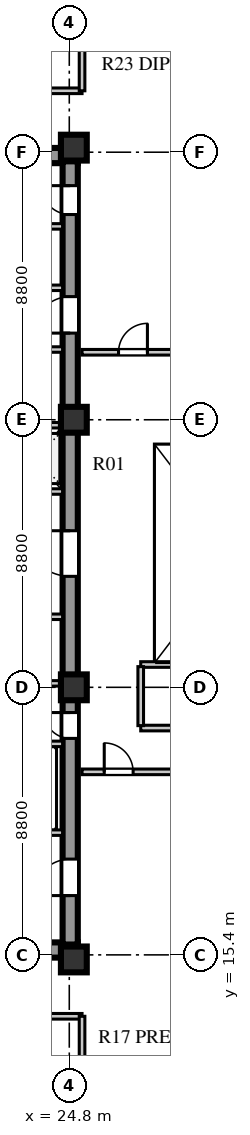
"""IFC4 building model, lengths in metres.
Left out: names, types, materials, properties, quantities, classifications, styles, units other than length and angle.
Written with IfcOpenShell. Run it as: python <this file> out.ifc"""

import sys

from ifc_helpers import new_model, si_unit, direction, frame, frame_2d, origin, origin_2d, place, context, subcontext, project, spatial, rectangle, extrude, element, fill, save


model = new_model("IFC4")
c1 = context("Model", 3, precision=1e-05, world=origin(), true_north=direction((0.0, 1.0)))
c2 = subcontext(c1, "Body", "Model", "MODEL_VIEW")
j1 = project(units=[si_unit("LENGTHUNIT", "METRE"), si_unit("PLANEANGLEUNIT", "RADIAN")], contexts=[c1])
p1 = place(None, origin())
s1 = spatial("IfcSite", under=j1, at=p1, CompositionType="ELEMENT")
p2 = place(p1, origin())
s2 = spatial("IfcBuilding", under=s1, at=p2, CompositionType="ELEMENT")
p3 = place(p2, frame((0.0, 0.0, 157.9)))
s3 = spatial("IfcBuildingStorey", under=s2, at=p3, CompositionType="ELEMENT", Elevation=157.9)
for number, where, z_axis, x_axis in (
    (1, (15.4, 15.56, 0.0), (0.0, 0.0, 1.0), (1.0, 0.0, 0.0)),
    (2, (15.4, 41.69, 0.0), (0.0, 0.0, 1.0), (1.0, 0.0, 0.0)),
):
    element("IfcWall", number, at=place(p3, frame(where, z_axis=z_axis, x_axis=x_axis)), inside=s3, PredefinedType="SHEAR", context=c2, shape_type="SweptSolid", body=[
        extrude(rectangle(XDim=9.68, YDim=0.5, at=frame_2d((4.84, 0.0))), origin(), (0.0, 0.0, 1.0), 3.6),
    ])
p4 = place(p3, frame((24.83, 15.74, 0.0), z_axis=(0.0, 0.0, 1.0), x_axis=(0.0, 1.0, 0.0)))
e3 = element("IfcWall", 3, at=p4, inside=s3, PredefinedType="SHEAR", context=c2, shape_type="SweptSolid", body=[
    extrude(rectangle(XDim=25.76, YDim=0.5, at=frame_2d((12.88, 0.0))), origin(), (0.0, 0.0, 1.0), 3.6),
])
p5 = place(p4, frame((1.61, 0.0, 0.0)))
e4 = element("IfcOpeningElement", 4, at=p5, cuts=e3, PredefinedType="OPENING", context=c2, shape_type="SweptSolid", body=[
    extrude(rectangle(XDim=1.2, YDim=2.1, at=frame_2d((0.6, 1.05))), frame((0.0, 0.26, 0.0), z_axis=(0.0, -1.0, 0.0), x_axis=(1.0, 0.0, 0.0)), (0.0, 0.0, 1.0), 0.52),
])
p6 = place(p4, frame((6.78, 0.0, 0.0)))
e5 = element("IfcOpeningElement", 5, at=p6, cuts=e3, PredefinedType="OPENING", context=c2, shape_type="SweptSolid", body=[
    extrude(rectangle(XDim=0.85, YDim=2.06, at=frame_2d((0.425, 1.03))), frame((0.0, 0.26, 0.0), z_axis=(0.0, -1.0, 0.0), x_axis=(1.0, 0.0, 0.0)), (0.0, 0.0, 1.0), 0.52),
])
p7 = place(p4, frame((12.11, 0.0, 0.0)))
e6 = element("IfcOpeningElement", 6, at=p7, cuts=e3, PredefinedType="OPENING", context=c2, shape_type="SweptSolid", body=[
    extrude(rectangle(XDim=1.5, YDim=2.12, at=frame_2d((0.75, 1.06))), frame((0.0, 0.26, 0.0), z_axis=(0.0, -1.0, 0.0), x_axis=(1.0, 0.0, 0.0)), (0.0, 0.0, 1.0), 0.52),
])
p8 = place(p4, frame((20.11, 0.0, 0.0)))
e7 = element("IfcOpeningElement", 7, at=p8, cuts=e3, PredefinedType="OPENING", context=c2, shape_type="SweptSolid", body=[
    extrude(rectangle(XDim=1.2, YDim=2.12, at=frame_2d((0.6, 1.06))), frame((0.0, 0.26, 0.0), z_axis=(0.0, -1.0, 0.0), x_axis=(1.0, 0.0, 0.0)), (0.0, 0.0, 1.0), 0.52),
])
p9 = place(p4, frame((24.01, 0.0, 0.0)))
e8 = element("IfcOpeningElement", 8, at=p9, cuts=e3, PredefinedType="OPENING", context=c2, shape_type="SweptSolid", body=[
    extrude(rectangle(XDim=0.95, YDim=2.1, at=frame_2d((0.475, 1.05))), frame((0.0, 0.26, 0.0), z_axis=(0.0, -1.0, 0.0), x_axis=(1.0, 0.0, 0.0)), (0.0, 0.0, 1.0), 0.52),
])
for number, where, z_axis, x_axis in (
    (9, (24.95, 15.25, 0.0), (0.0, 0.0, 1.0), (1.0, 0.0, 0.0)),
    (10, (24.95, 24.2, 0.0), (0.0, 0.0, 1.0), (1.0, 0.0, 0.0)),
    (11, (24.95, 33.0, 0.0), (0.0, 0.0, 1.0), (1.0, 0.0, 0.0)),
    (12, (24.95, 41.95, 0.0), (0.0, 0.0, 1.0), (1.0, 0.0, 0.0)),
):
    element("IfcColumn", number, at=place(p3, frame(where, z_axis=z_axis, x_axis=x_axis)), inside=s3, PredefinedType="COLUMN", context=c2, shape_type="SweptSolid", body=[
        extrude(rectangle(XDim=0.85, YDim=0.85, at=origin_2d()), origin(), (0.0, 0.0, 1.0), 3.6),
    ])
p10 = place(p3, frame((19.64, 19.42, 0.0), z_axis=(0.0, 0.0, 1.0), x_axis=(1.0, 0.0, 0.0)))
e13 = element("IfcWall", 13, at=p10, inside=s3, PredefinedType="SOLIDWALL", context=c2, shape_type="SweptSolid", body=[
    extrude(rectangle(XDim=4.94, YDim=0.18, at=frame_2d((2.47, 0.0))), origin(), (0.0, 0.0, 1.0), 3.6),
])
p11 = place(p10, frame((0.72, 0.0, 0.0)))
e14 = element("IfcOpeningElement", 14, at=p11, cuts=e13, PredefinedType="OPENING", context=c2, shape_type="SweptSolid", body=[
    extrude(rectangle(XDim=1.1, YDim=2.1, at=frame_2d((0.55, 1.05))), frame((0.0, 0.1, 0.0), z_axis=(0.0, -1.0, 0.0), x_axis=(1.0, 0.0, 0.0)), (0.0, 0.0, 1.0), 0.2),
])
p12 = place(p10, frame((3.02, 0.0, 0.0)))
e15 = element("IfcOpeningElement", 15, at=p12, cuts=e13, PredefinedType="OPENING", context=c2, shape_type="SweptSolid", body=[
    extrude(rectangle(XDim=1.1, YDim=2.1, at=frame_2d((0.55, 1.05))), frame((0.0, 0.1, 0.0), z_axis=(0.0, -1.0, 0.0), x_axis=(1.0, 0.0, 0.0)), (0.0, 0.0, 1.0), 0.2),
])
p13 = place(p3, frame((19.64, 22.34, 0.0), z_axis=(0.0, 0.0, 1.0), x_axis=(1.0, 0.0, 0.0)))
e16 = element("IfcWall", 16, at=p13, inside=s3, PredefinedType="SOLIDWALL", context=c2, shape_type="SweptSolid", body=[
    extrude(rectangle(XDim=4.94, YDim=0.18, at=frame_2d((2.47, 0.0))), origin(), (0.0, 0.0, 1.0), 3.6),
])
p14 = place(p3, frame((15.9, 26.52, 0.0), z_axis=(0.0, 0.0, 1.0), x_axis=(1.0, 0.0, 0.0)))
e17 = element("IfcWall", 17, at=p14, inside=s3, PredefinedType="SOLIDWALL", context=c2, shape_type="SweptSolid", body=[
    extrude(rectangle(XDim=8.68, YDim=0.18, at=frame_2d((4.34, 0.0))), origin(), (0.0, 0.0, 1.0), 3.6),
])
p15 = place(p14, frame((2.05, 0.0, 0.0)))
e18 = element("IfcOpeningElement", 18, at=p15, cuts=e17, PredefinedType="OPENING", context=c2, shape_type="SweptSolid", body=[
    extrude(rectangle(XDim=0.85, YDim=2.06, at=frame_2d((0.425, 1.03))), frame((0.0, 0.1, 0.0), z_axis=(0.0, -1.0, 0.0), x_axis=(1.0, 0.0, 0.0)), (0.0, 0.0, 1.0), 0.2),
])
p16 = place(p14, frame((5.2, 0.0, 0.0)))
e19 = element("IfcOpeningElement", 19, at=p16, cuts=e17, PredefinedType="OPENING", context=c2, shape_type="SweptSolid", body=[
    extrude(rectangle(XDim=0.95, YDim=2.1, at=frame_2d((0.475, 1.05))), frame((0.0, 0.1, 0.0), z_axis=(0.0, -1.0, 0.0), x_axis=(1.0, 0.0, 0.0)), (0.0, 0.0, 1.0), 0.2),
])
p17 = place(p3, frame((15.9, 24.33, 0.0), z_axis=(0.0, 0.0, 1.0), x_axis=(1.0, 0.0, 0.0)))
e20 = element("IfcWall", 20, at=p17, inside=s3, PredefinedType="SOLIDWALL", context=c2, shape_type="SweptSolid", body=[
    extrude(rectangle(XDim=8.68, YDim=0.18, at=frame_2d((4.34, 0.0))), origin(), (0.0, 0.0, 1.0), 2.95),
])
p18 = place(p3, frame((15.9, 30.64, 0.0), z_axis=(0.0, 0.0, 1.0), x_axis=(1.0, 0.0, 0.0)))
e21 = element("IfcWall", 21, at=p18, inside=s3, PredefinedType="SOLIDWALL", context=c2, shape_type="SweptSolid", body=[
    extrude(rectangle(XDim=8.68, YDim=0.18, at=frame_2d((4.34, 0.0))), origin(), (0.0, 0.0, 1.0), 3.6),
])
p19 = place(p18, frame((1.76, 0.0, 0.0)))
e22 = element("IfcOpeningElement", 22, at=p19, cuts=e21, PredefinedType="OPENING", context=c2, shape_type="SweptSolid", body=[
    extrude(rectangle(XDim=1.0, YDim=2.1, at=frame_2d((0.5, 1.05))), frame((0.0, 0.1, 0.0), z_axis=(0.0, -1.0, 0.0), x_axis=(1.0, 0.0, 0.0)), (0.0, 0.0, 1.0), 0.2),
])
p20 = place(p18, frame((3.6, 0.0, 0.0)))
e23 = element("IfcOpeningElement", 23, at=p20, cuts=e21, PredefinedType="OPENING", context=c2, shape_type="SweptSolid", body=[
    extrude(rectangle(XDim=1.0, YDim=2.1, at=frame_2d((0.5, 1.05))), frame((0.0, 0.1, 0.0), z_axis=(0.0, -1.0, 0.0), x_axis=(1.0, 0.0, 0.0)), (0.0, 0.0, 1.0), 0.2),
])
p21 = place(p18, frame((5.44, 0.0, 0.0)))
e24 = element("IfcOpeningElement", 24, at=p21, cuts=e21, PredefinedType="OPENING", context=c2, shape_type="SweptSolid", body=[
    extrude(rectangle(XDim=1.0, YDim=2.1, at=frame_2d((0.5, 1.05))), frame((0.0, 0.1, 0.0), z_axis=(0.0, -1.0, 0.0), x_axis=(1.0, 0.0, 0.0)), (0.0, 0.0, 1.0), 0.2),
])
p22 = place(p18, frame((7.28, 0.0, 0.0)))
e25 = element("IfcOpeningElement", 25, at=p22, cuts=e21, PredefinedType="OPENING", context=c2, shape_type="SweptSolid", body=[
    extrude(rectangle(XDim=1.0, YDim=2.1, at=frame_2d((0.5, 1.05))), frame((0.0, 0.1, 0.0), z_axis=(0.0, -1.0, 0.0), x_axis=(1.0, 0.0, 0.0)), (0.0, 0.0, 1.0), 0.2),
])
p23 = place(p3, frame((15.9, 32.82, 0.0), z_axis=(0.0, 0.0, 1.0), x_axis=(1.0, 0.0, 0.0)))
e26 = element("IfcWall", 26, at=p23, inside=s3, PredefinedType="SOLIDWALL", context=c2, shape_type="SweptSolid", body=[
    extrude(rectangle(XDim=8.68, YDim=0.18, at=frame_2d((4.34, 0.0))), origin(), (0.0, 0.0, 1.0), 2.95),
])
p24 = place(p3, frame((22.02, 35.31, 0.0), z_axis=(0.0, 0.0, 1.0), x_axis=(1.0, 0.0, 0.0)))
e27 = element("IfcWall", 27, at=p24, inside=s3, PredefinedType="SOLIDWALL", context=c2, shape_type="SweptSolid", body=[
    extrude(rectangle(XDim=2.56, YDim=0.18, at=frame_2d((1.28, 0.0))), origin(), (0.0, 0.0, 1.0), 3.6),
])
p25 = place(p24, frame((0.55, 0.0, 0.0)))
e28 = element("IfcOpeningElement", 28, at=p25, cuts=e27, PredefinedType="OPENING", context=c2, shape_type="SweptSolid", body=[
    extrude(rectangle(XDim=1.0, YDim=2.1, at=frame_2d((0.5, 1.05))), frame((0.0, 0.1, 0.0), z_axis=(0.0, -1.0, 0.0), x_axis=(1.0, 0.0, 0.0)), (0.0, 0.0, 1.0), 0.2),
])
p26 = place(p3, frame((19.64, 37.34, 0.0), z_axis=(0.0, 0.0, 1.0), x_axis=(1.0, 0.0, 0.0)))
e29 = element("IfcWall", 29, at=p26, inside=s3, PredefinedType="SOLIDWALL", context=c2, shape_type="SweptSolid", body=[
    extrude(rectangle(XDim=4.94, YDim=0.18, at=frame_2d((2.47, 0.0))), origin(), (0.0, 0.0, 1.0), 3.6),
])
p27 = place(p26, frame((0.45, 0.0, 0.0)))
e30 = element("IfcOpeningElement", 30, at=p27, cuts=e29, PredefinedType="OPENING", context=c2, shape_type="SweptSolid", body=[
    extrude(rectangle(XDim=1.0, YDim=2.1, at=frame_2d((0.5, 1.05))), frame((0.0, 0.1, 0.0), z_axis=(0.0, -1.0, 0.0), x_axis=(1.0, 0.0, 0.0)), (0.0, 0.0, 1.0), 0.2),
])
p28 = place(p26, frame((2.5, 0.0, 0.0)))
e31 = element("IfcOpeningElement", 31, at=p28, cuts=e29, PredefinedType="OPENING", context=c2, shape_type="SweptSolid", body=[
    extrude(rectangle(XDim=1.0, YDim=2.1, at=frame_2d((0.5, 1.05))), frame((0.0, 0.1, 0.0), z_axis=(0.0, -1.0, 0.0), x_axis=(1.0, 0.0, 0.0)), (0.0, 0.0, 1.0), 0.2),
])
p29 = place(p3, frame((19.64, 39.36, 0.0), z_axis=(0.0, 0.0, 1.0), x_axis=(1.0, 0.0, 0.0)))
e32 = element("IfcWall", 32, at=p29, inside=s3, PredefinedType="SOLIDWALL", context=c2, shape_type="SweptSolid", body=[
    extrude(rectangle(XDim=4.94, YDim=0.18, at=frame_2d((2.47, 0.0))), origin(), (0.0, 0.0, 1.0), 3.6),
])
p30 = place(p3, frame((25.22, 21.42, 0.0), z_axis=(0.0, 0.0, 1.0), x_axis=(1.0, 0.0, 0.0)))
e33 = element("IfcWall", 33, at=p30, inside=s3, PredefinedType="SOLIDWALL", context=c2, shape_type="SweptSolid", body=[
    extrude(rectangle(XDim=15.6, YDim=0.185, at=frame_2d((7.8, 0.0))), origin(), (0.0, 0.0, 1.0), 3.25),
])
p31 = place(p30, frame((0.73, 0.0, 0.0)))
e34 = element("IfcOpeningElement", 34, at=p31, cuts=e33, PredefinedType="OPENING", context=c2, shape_type="SweptSolid", body=[
    extrude(rectangle(XDim=0.95, YDim=2.1, at=frame_2d((0.475, 1.05))), frame((0.0, 0.103, 0.0), z_axis=(0.0, -1.0, 0.0), x_axis=(1.0, 0.0, 0.0)), (0.0, 0.0, 1.0), 0.205),
])
p32 = place(p3, frame((27.15, 22.86, 0.0), z_axis=(0.0, 0.0, 1.0), x_axis=(1.0, 0.0, 0.0)))
e35 = element("IfcWall", 35, at=p32, inside=s3, PredefinedType="SOLIDWALL", context=c2, shape_type="SweptSolid", body=[
    extrude(rectangle(XDim=13.67, YDim=0.185, at=frame_2d((6.835, 0.0))), origin(), (0.0, 0.0, 1.0), 3.6),
])
p33 = place(p32, frame((2.2, 0.0, 0.0)))
e36 = element("IfcOpeningElement", 36, at=p33, cuts=e35, PredefinedType="OPENING", context=c2, shape_type="SweptSolid", body=[
    extrude(rectangle(XDim=0.9, YDim=2.08, at=frame_2d((0.45, 1.04))), frame((0.0, 0.103, 0.0), z_axis=(0.0, -1.0, 0.0), x_axis=(1.0, 0.0, 0.0)), (0.0, 0.0, 1.0), 0.205),
])
p34 = place(p3, frame((25.22, 35.22, 0.0), z_axis=(0.0, 0.0, 1.0), x_axis=(1.0, 0.0, 0.0)))
e37 = element("IfcWall", 37, at=p34, inside=s3, PredefinedType="SOLIDWALL", context=c2, shape_type="SweptSolid", body=[
    extrude(rectangle(XDim=9.5, YDim=0.185, at=frame_2d((4.75, 0.0))), origin(), (0.0, 0.0, 1.0), 3.6),
])
p35 = place(p34, frame((1.2, 0.0, 0.0)))
e38 = element("IfcOpeningElement", 38, at=p35, cuts=e37, PredefinedType="OPENING", context=c2, shape_type="SweptSolid", body=[
    extrude(rectangle(XDim=0.95, YDim=2.1, at=frame_2d((0.475, 1.05))), frame((0.0, 0.103, 0.0), z_axis=(0.0, -1.0, 0.0), x_axis=(1.0, 0.0, 0.0)), (0.0, 0.0, 1.0), 0.205),
])
p36 = place(p3, frame((13.39, 13.38, 0.0), z_axis=(0.0, 0.0, 1.0), x_axis=(1.0, 0.0, 0.0)))
e39 = element("IfcWall", 39, at=p36, inside=s3, PredefinedType="SOLIDWALL", context=c2, shape_type="SweptSolid", body=[
    extrude(rectangle(XDim=11.83, YDim=0.185, at=frame_2d((5.915, 0.0))), origin(), (0.0, 0.0, 1.0), 3.6),
])
p37 = place(p36, frame((4.76, 0.0, 0.0)))
e40 = element("IfcOpeningElement", 40, at=p37, cuts=e39, PredefinedType="OPENING", context=c2, shape_type="SweptSolid", body=[
    extrude(rectangle(XDim=1.0, YDim=2.08, at=frame_2d((0.5, 1.04))), frame((0.0, 0.103, 0.0), z_axis=(0.0, -1.0, 0.0), x_axis=(1.0, 0.0, 0.0)), (0.0, 0.0, 1.0), 0.205),
])
p38 = place(p3, frame((25.22, 7.88, 0.0), z_axis=(0.0, 0.0, 1.0), x_axis=(0.0, 1.0, 0.0)))
e41 = element("IfcWall", 41, at=p38, inside=s3, PredefinedType="SOLIDWALL", context=c2, shape_type="SweptSolid", body=[
    extrude(rectangle(XDim=5.5, YDim=0.185, at=frame_2d((2.75, 0.0))), origin(), (0.0, 0.0, 1.0), 3.15),
])
p39 = place(p3, frame((13.39, 43.82, 0.0), z_axis=(0.0, 0.0, 1.0), x_axis=(1.0, 0.0, 0.0)))
e42 = element("IfcWall", 42, at=p39, inside=s3, PredefinedType="SOLIDWALL", context=c2, shape_type="SweptSolid", body=[
    extrude(rectangle(XDim=11.83, YDim=0.185, at=frame_2d((5.915, 0.0))), origin(), (0.0, 0.0, 1.0), 3.6),
])
p40 = place(p39, frame((4.76, 0.0, 0.0)))
e43 = element("IfcOpeningElement", 43, at=p40, cuts=e42, PredefinedType="OPENING", context=c2, shape_type="SweptSolid", body=[
    extrude(rectangle(XDim=1.0, YDim=2.08, at=frame_2d((0.5, 1.04))), frame((0.0, 0.103, 0.0), z_axis=(0.0, -1.0, 0.0), x_axis=(1.0, 0.0, 0.0)), (0.0, 0.0, 1.0), 0.205),
])
p41 = place(p3, frame((25.22, 43.82, 0.0), z_axis=(0.0, 0.0, 1.0), x_axis=(0.0, 1.0, 0.0)))
e44 = element("IfcWall", 44, at=p41, inside=s3, PredefinedType="SOLIDWALL", context=c2, shape_type="SweptSolid", body=[
    extrude(rectangle(XDim=5.5, YDim=0.185, at=frame_2d((2.75, 0.0))), origin(), (0.0, 0.0, 1.0), 3.15),
])
p42 = place(p3, frame((27.15, 24.95, 0.0), z_axis=(0.0, 0.0, 1.0), x_axis=(1.0, 0.0, 0.0)))
e45 = element("IfcWall", 45, at=p42, inside=s3, PredefinedType="SOLIDWALL", context=c2, shape_type="SweptSolid", body=[
    extrude(rectangle(XDim=9.67, YDim=0.185, at=frame_2d((4.835, 0.0))), origin(), (0.0, 0.0, 1.0), 3.05),
])
p43 = place(p3, frame((27.15, 22.94, 0.0), z_axis=(0.0, 0.0, 1.0), x_axis=(0.0, 1.0, 0.0)))
e46 = element("IfcWall", 46, at=p43, inside=s3, PredefinedType="SOLIDWALL", context=c2, shape_type="SweptSolid", body=[
    extrude(rectangle(XDim=1.94, YDim=0.185, at=frame_2d((0.97, 0.0))), origin(), (0.0, 0.0, 1.0), 3.6),
])
p44 = place(p5, frame((1.2, 0.0, 0.0), z_axis=(0.0, 0.0, 1.0), x_axis=(-1.0, 0.0, 0.0)))
e47 = element("IfcDoor", 47, at=p44, inside=s3, OperationType="SINGLE_SWING_RIGHT", PredefinedType="DOOR", context=c2, shape_type="SweptSolid", body=[
    extrude(rectangle(XDim=1.2, YDim=2.1, at=frame_2d((0.6, 1.05))), frame((0.0, 0.025, 0.0), z_axis=(0.0, -1.0, 0.0), x_axis=(1.0, 0.0, 0.0)), (0.0, 0.0, 1.0), 0.05),
])
fill(e4, e47)
p45 = place(p6, frame((0.85, 0.0, 0.0), z_axis=(0.0, 0.0, 1.0), x_axis=(-1.0, 0.0, 0.0)))
e48 = element("IfcDoor", 48, at=p45, inside=s3, OperationType="SINGLE_SWING_LEFT", PredefinedType="DOOR", context=c2, shape_type="SweptSolid", body=[
    extrude(rectangle(XDim=0.85, YDim=2.06, at=frame_2d((0.425, 1.03))), frame((0.0, 0.025, 0.0), z_axis=(0.0, -1.0, 0.0), x_axis=(1.0, 0.0, 0.0)), (0.0, 0.0, 1.0), 0.05),
])
fill(e5, e48)
p46 = place(p7, frame((1.5, 0.0, 0.0), z_axis=(0.0, 0.0, 1.0), x_axis=(-1.0, 0.0, 0.0)))
e49 = element("IfcDoor", 49, at=p46, inside=s3, OperationType="SINGLE_SWING_LEFT", PredefinedType="DOOR", context=c2, shape_type="SweptSolid", body=[
    extrude(rectangle(XDim=1.5, YDim=2.12, at=frame_2d((0.75, 1.06))), frame((0.0, 0.025, 0.0), z_axis=(0.0, -1.0, 0.0), x_axis=(1.0, 0.0, 0.0)), (0.0, 0.0, 1.0), 0.05),
])
fill(e6, e49)
p47 = place(p8, frame((1.2, 0.0, 0.0), z_axis=(0.0, 0.0, 1.0), x_axis=(-1.0, 0.0, 0.0)))
e50 = element("IfcDoor", 50, at=p47, inside=s3, OperationType="SINGLE_SWING_RIGHT", PredefinedType="DOOR", context=c2, shape_type="SweptSolid", body=[
    extrude(rectangle(XDim=1.2, YDim=2.12, at=frame_2d((0.6, 1.06))), frame((0.0, 0.025, 0.0), z_axis=(0.0, -1.0, 0.0), x_axis=(1.0, 0.0, 0.0)), (0.0, 0.0, 1.0), 0.05),
])
fill(e7, e50)
p48 = place(p9, frame((0.95, 0.0, 0.0), z_axis=(0.0, 0.0, 1.0), x_axis=(-1.0, 0.0, 0.0)))
e51 = element("IfcDoor", 51, at=p48, inside=s3, OperationType="SINGLE_SWING_LEFT", PredefinedType="DOOR", context=c2, shape_type="SweptSolid", body=[
    extrude(rectangle(XDim=0.95, YDim=2.1, at=frame_2d((0.475, 1.05))), frame((0.0, 0.025, 0.0), z_axis=(0.0, -1.0, 0.0), x_axis=(1.0, 0.0, 0.0)), (0.0, 0.0, 1.0), 0.05),
])
fill(e8, e51)
p49 = place(p31, frame((0.95, 0.0, 0.0), z_axis=(0.0, 0.0, 1.0), x_axis=(-1.0, 0.0, 0.0)))
e52 = element("IfcDoor", 52, at=p49, inside=s3, OperationType="SINGLE_SWING_RIGHT", PredefinedType="DOOR", context=c2, shape_type="SweptSolid", body=[
    extrude(rectangle(XDim=0.95, YDim=2.1, at=frame_2d((0.475, 1.05))), frame((0.0, 0.025, 0.0), z_axis=(0.0, -1.0, 0.0), x_axis=(1.0, 0.0, 0.0)), (0.0, 0.0, 1.0), 0.05),
])
fill(e34, e52)
p50 = place(p35, origin())
e53 = element("IfcDoor", 53, at=p50, inside=s3, OperationType="SINGLE_SWING_RIGHT", PredefinedType="DOOR", context=c2, shape_type="SweptSolid", body=[
    extrude(rectangle(XDim=0.95, YDim=2.1, at=frame_2d((0.475, 1.05))), frame((0.0, 0.025, 0.0), z_axis=(0.0, -1.0, 0.0), x_axis=(1.0, 0.0, 0.0)), (0.0, 0.0, 1.0), 0.05),
])
fill(e38, e53)
save(model, sys.argv[1])
